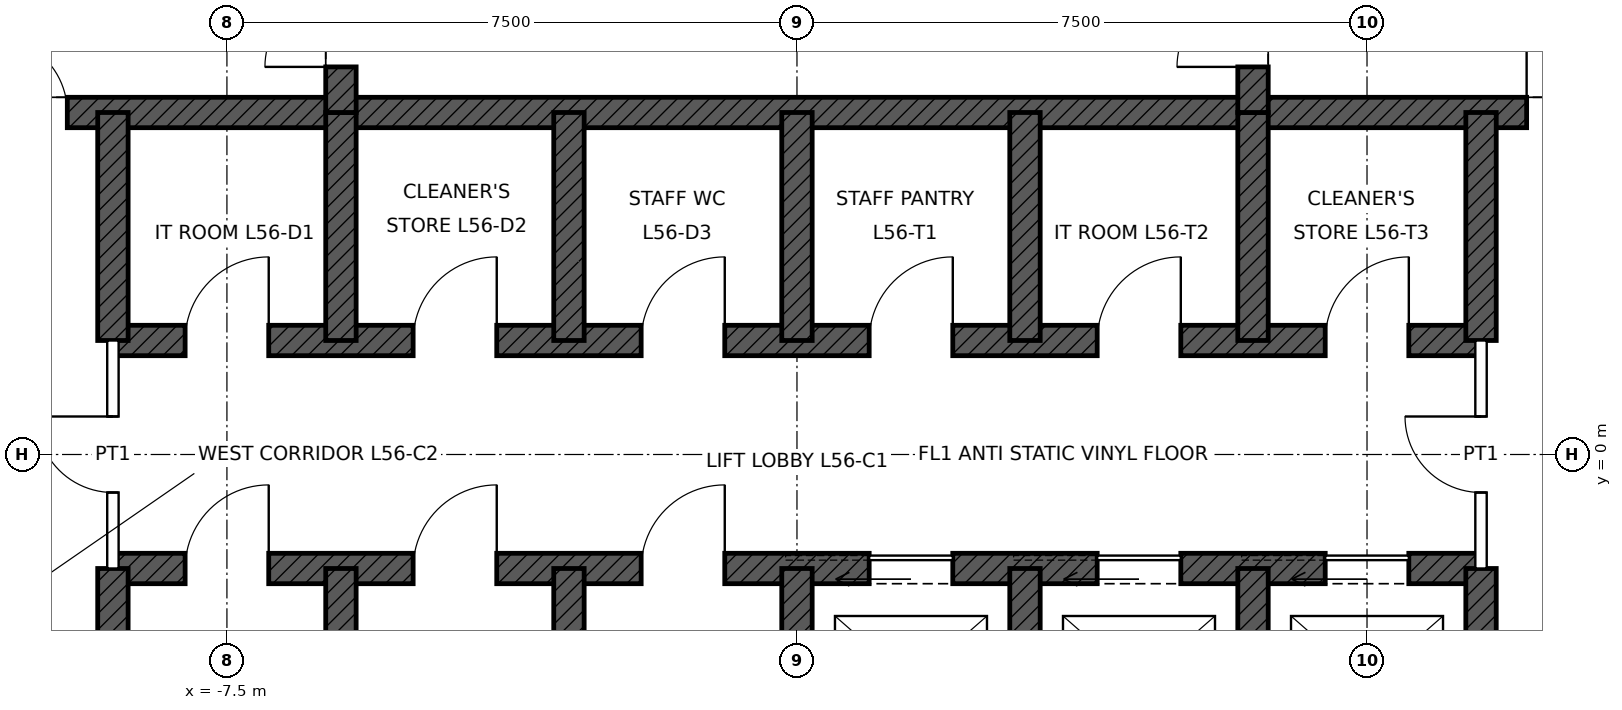
"""IFC4 building model, lengths in metres.
Left out: names, types, materials, properties, quantities, classifications, styles, units other than length and angle.
Written with IfcOpenShell. Run it as: python <this file> out.ifc"""

import sys

from ifc_helpers import new_model, si_unit, direction, frame, frame_2d, origin, place, context, subcontext, project, spatial, rectangle, extrude, element, fill, save


model = new_model("IFC4")
c1 = context("Model", 3, precision=1e-05, world=origin(), true_north=direction((0.0, 1.0)))
c2 = subcontext(c1, "Body", "Model", "MODEL_VIEW")
j1 = project(units=[si_unit("LENGTHUNIT", "METRE"), si_unit("PLANEANGLEUNIT", "RADIAN")], contexts=[c1])
p1 = place(None, origin())
s1 = spatial("IfcSite", under=j1, at=p1, CompositionType="ELEMENT")
p2 = place(p1, origin())
s2 = spatial("IfcBuilding", under=s1, at=p2, CompositionType="ELEMENT")
p3 = place(p2, frame((0.0, 0.0, 259.9)))
s3 = spatial("IfcBuildingStorey", under=s2, at=p3, CompositionType="ELEMENT", Elevation=259.9)
p4 = place(p3, frame((-11.0, 4.5, 0.0), z_axis=(0.0, 0.0, 1.0), x_axis=(1.0, 0.0, 0.0)))
e1 = element("IfcWall", 1, at=p4, inside=s3, PredefinedType="SHEAR", context=c2, shape_type="SweptSolid", body=[
    extrude(rectangle(XDim=22.0, YDim=0.4, at=frame_2d((11.0, 0.0))), origin(), (0.0, 0.0, 1.0), 4.0),
])
p5 = place(p4, frame((0.4, 0.0, 0.0)))
e2 = element("IfcOpeningElement", 2, at=p5, cuts=e1, PredefinedType="OPENING", context=c2, shape_type="SweptSolid", body=[
    extrude(rectangle(XDim=1.0, YDim=2.1, at=frame_2d((0.5, 1.05))), frame((0.0, 0.21, 0.0), z_axis=(0.0, -1.0, 0.0), x_axis=(1.0, 0.0, 0.0)), (0.0, 0.0, 1.0), 0.42),
])
p6 = place(p4, frame((20.6, 0.0, 0.0)))
e3 = element("IfcOpeningElement", 3, at=p6, cuts=e1, PredefinedType="OPENING", context=c2, shape_type="SweptSolid", body=[
    extrude(rectangle(XDim=1.0, YDim=2.1, at=frame_2d((0.5, 1.05))), frame((0.0, 0.21, 0.0), z_axis=(0.0, -1.0, 0.0), x_axis=(1.0, 0.0, 0.0)), (0.0, 0.0, 1.0), 0.42),
])
p7 = place(p3, frame((-9.0, 1.5, 0.0), z_axis=(0.0, 0.0, 1.0), x_axis=(1.0, 0.0, 0.0)))
e4 = element("IfcWall", 4, at=p7, inside=s3, PredefinedType="SHEAR", context=c2, shape_type="SweptSolid", body=[
    extrude(rectangle(XDim=18.0, YDim=0.4, at=frame_2d((9.0, 0.0))), origin(), (0.0, 0.0, 1.0), 4.0),
])
p8 = place(p7, frame((0.95, 0.0, 0.0)))
e5 = element("IfcOpeningElement", 5, at=p8, cuts=e4, PredefinedType="OPENING", context=c2, shape_type="SweptSolid", body=[
    extrude(rectangle(XDim=1.1, YDim=2.1, at=frame_2d((0.55, 1.05))), frame((0.0, 0.21, 0.0), z_axis=(0.0, -1.0, 0.0), x_axis=(1.0, 0.0, 0.0)), (0.0, 0.0, 1.0), 0.42),
])
p9 = place(p7, frame((3.95, 0.0, 0.0)))
e6 = element("IfcOpeningElement", 6, at=p9, cuts=e4, PredefinedType="OPENING", context=c2, shape_type="SweptSolid", body=[
    extrude(rectangle(XDim=1.1, YDim=2.1, at=frame_2d((0.55, 1.05))), frame((0.0, 0.21, 0.0), z_axis=(0.0, -1.0, 0.0), x_axis=(1.0, 0.0, 0.0)), (0.0, 0.0, 1.0), 0.42),
])
p10 = place(p7, frame((6.95, 0.0, 0.0)))
e7 = element("IfcOpeningElement", 7, at=p10, cuts=e4, PredefinedType="OPENING", context=c2, shape_type="SweptSolid", body=[
    extrude(rectangle(XDim=1.1, YDim=2.1, at=frame_2d((0.55, 1.05))), frame((0.0, 0.21, 0.0), z_axis=(0.0, -1.0, 0.0), x_axis=(1.0, 0.0, 0.0)), (0.0, 0.0, 1.0), 0.42),
])
p11 = place(p7, frame((9.95, 0.0, 0.0)))
e8 = element("IfcOpeningElement", 8, at=p11, cuts=e4, PredefinedType="OPENING", context=c2, shape_type="SweptSolid", body=[
    extrude(rectangle(XDim=1.1, YDim=2.1, at=frame_2d((0.55, 1.05))), frame((0.0, 0.21, 0.0), z_axis=(0.0, -1.0, 0.0), x_axis=(1.0, 0.0, 0.0)), (0.0, 0.0, 1.0), 0.42),
])
p12 = place(p7, frame((12.95, 0.0, 0.0)))
e9 = element("IfcOpeningElement", 9, at=p12, cuts=e4, PredefinedType="OPENING", context=c2, shape_type="SweptSolid", body=[
    extrude(rectangle(XDim=1.1, YDim=2.1, at=frame_2d((0.55, 1.05))), frame((0.0, 0.21, 0.0), z_axis=(0.0, -1.0, 0.0), x_axis=(1.0, 0.0, 0.0)), (0.0, 0.0, 1.0), 0.42),
])
p13 = place(p7, frame((15.95, 0.0, 0.0)))
e10 = element("IfcOpeningElement", 10, at=p13, cuts=e4, PredefinedType="OPENING", context=c2, shape_type="SweptSolid", body=[
    extrude(rectangle(XDim=1.1, YDim=2.1, at=frame_2d((0.55, 1.05))), frame((0.0, 0.21, 0.0), z_axis=(0.0, -1.0, 0.0), x_axis=(1.0, 0.0, 0.0)), (0.0, 0.0, 1.0), 0.42),
])
p14 = place(p3, frame((-9.0, -1.5, 0.0), z_axis=(0.0, 0.0, 1.0), x_axis=(1.0, 0.0, 0.0)))
e11 = element("IfcWall", 11, at=p14, inside=s3, PredefinedType="SHEAR", context=c2, shape_type="SweptSolid", body=[
    extrude(rectangle(XDim=18.0, YDim=0.4, at=frame_2d((9.0, 0.0))), origin(), (0.0, 0.0, 1.0), 4.0),
])
p15 = place(p14, frame((9.95, 0.0, 0.0)))
e12 = element("IfcOpeningElement", 12, at=p15, cuts=e11, PredefinedType="OPENING", context=c2, shape_type="SweptSolid", body=[
    extrude(rectangle(XDim=1.1, YDim=2.1, at=frame_2d((0.55, 1.05))), frame((0.0, 0.21, 0.0), z_axis=(0.0, -1.0, 0.0), x_axis=(1.0, 0.0, 0.0)), (0.0, 0.0, 1.0), 0.42),
])
p16 = place(p14, frame((12.95, 0.0, 0.0)))
e13 = element("IfcOpeningElement", 13, at=p16, cuts=e11, PredefinedType="OPENING", context=c2, shape_type="SweptSolid", body=[
    extrude(rectangle(XDim=1.1, YDim=2.1, at=frame_2d((0.55, 1.05))), frame((0.0, 0.21, 0.0), z_axis=(0.0, -1.0, 0.0), x_axis=(1.0, 0.0, 0.0)), (0.0, 0.0, 1.0), 0.42),
])
p17 = place(p14, frame((15.95, 0.0, 0.0)))
e14 = element("IfcOpeningElement", 14, at=p17, cuts=e11, PredefinedType="OPENING", context=c2, shape_type="SweptSolid", body=[
    extrude(rectangle(XDim=1.1, YDim=2.1, at=frame_2d((0.55, 1.05))), frame((0.0, 0.21, 0.0), z_axis=(0.0, -1.0, 0.0), x_axis=(1.0, 0.0, 0.0)), (0.0, 0.0, 1.0), 0.42),
])
p18 = place(p14, frame((0.95, 0.0, 0.0)))
e15 = element("IfcOpeningElement", 15, at=p18, cuts=e11, PredefinedType="OPENING", context=c2, shape_type="SweptSolid", body=[
    extrude(rectangle(XDim=1.1, YDim=2.1, at=frame_2d((0.55, 1.05))), frame((0.0, 0.21, 0.0), z_axis=(0.0, -1.0, 0.0), x_axis=(1.0, 0.0, 0.0)), (0.0, 0.0, 1.0), 0.42),
])
p19 = place(p14, frame((3.95, 0.0, 0.0)))
e16 = element("IfcOpeningElement", 16, at=p19, cuts=e11, PredefinedType="OPENING", context=c2, shape_type="SweptSolid", body=[
    extrude(rectangle(XDim=1.1, YDim=2.1, at=frame_2d((0.55, 1.05))), frame((0.0, 0.21, 0.0), z_axis=(0.0, -1.0, 0.0), x_axis=(1.0, 0.0, 0.0)), (0.0, 0.0, 1.0), 0.42),
])
p20 = place(p14, frame((6.95, 0.0, 0.0)))
e17 = element("IfcOpeningElement", 17, at=p20, cuts=e11, PredefinedType="OPENING", context=c2, shape_type="SweptSolid", body=[
    extrude(rectangle(XDim=1.1, YDim=2.1, at=frame_2d((0.55, 1.05))), frame((0.0, 0.21, 0.0), z_axis=(0.0, -1.0, 0.0), x_axis=(1.0, 0.0, 0.0)), (0.0, 0.0, 1.0), 0.42),
])
for number, where, z_axis, x_axis in (
    (18, (-9.0, 1.5, 0.0), (0.0, 0.0, 1.0), (0.0, 1.0, 0.0)),
    (19, (9.0, 1.5, 0.0), (0.0, 0.0, 1.0), (0.0, 1.0, 0.0)),
    (20, (-9.0, -4.5, 0.0), (0.0, 0.0, 1.0), (0.0, 1.0, 0.0)),
    (21, (9.0, -4.5, 0.0), (0.0, 0.0, 1.0), (0.0, 1.0, 0.0)),
    (22, (-6.0, 1.5, 0.0), (0.0, 0.0, 1.0), (0.0, 1.0, 0.0)),
    (23, (-3.0, 1.5, 0.0), (0.0, 0.0, 1.0), (0.0, 1.0, 0.0)),
    (24, (0.0, 1.5, 0.0), (0.0, 0.0, 1.0), (0.0, 1.0, 0.0)),
    (25, (3.0, 1.5, 0.0), (0.0, 0.0, 1.0), (0.0, 1.0, 0.0)),
    (26, (6.0, 1.5, 0.0), (0.0, 0.0, 1.0), (0.0, 1.0, 0.0)),
    (27, (-6.0, -4.5, 0.0), (0.0, 0.0, 1.0), (0.0, 1.0, 0.0)),
    (28, (-3.0, -4.5, 0.0), (0.0, 0.0, 1.0), (0.0, 1.0, 0.0)),
    (29, (0.0, -4.5, 0.0), (0.0, 0.0, 1.0), (0.0, 1.0, 0.0)),
    (30, (3.0, -4.5, 0.0), (0.0, 0.0, 1.0), (0.0, 1.0, 0.0)),
    (31, (6.0, -4.5, 0.0), (0.0, 0.0, 1.0), (0.0, 1.0, 0.0)),
):
    element("IfcWall", number, at=place(p3, frame(where, z_axis=z_axis, x_axis=x_axis)), inside=s3, PredefinedType="SHEAR", context=c2, shape_type="SweptSolid", body=[
        extrude(rectangle(XDim=3.0, YDim=0.4, at=frame_2d((1.5, 0.0))), origin(), (0.0, 0.0, 1.0), 4.0),
    ])
p21 = place(p3, frame((-6.0, 4.5, 0.0), z_axis=(0.0, 0.0, 1.0), x_axis=(0.0, 1.0, 0.0)))
e32 = element("IfcWall", 32, at=p21, inside=s3, PredefinedType="SHEAR", context=c2, shape_type="SweptSolid", body=[
    extrude(rectangle(XDim=6.5, YDim=0.4, at=frame_2d((3.25, 0.0))), origin(), (0.0, 0.0, 1.0), 4.0),
])
p22 = place(p21, frame((0.6, 0.0, 0.0)))
e33 = element("IfcOpeningElement", 33, at=p22, cuts=e32, PredefinedType="OPENING", context=c2, shape_type="SweptSolid", body=[
    extrude(rectangle(XDim=1.0, YDim=2.1, at=frame_2d((0.5, 1.05))), frame((0.0, 0.21, 0.0), z_axis=(0.0, -1.0, 0.0), x_axis=(1.0, 0.0, 0.0)), (0.0, 0.0, 1.0), 0.42),
])
p23 = place(p3, frame((6.0, 4.5, 0.0), z_axis=(0.0, 0.0, 1.0), x_axis=(0.0, 1.0, 0.0)))
e34 = element("IfcWall", 34, at=p23, inside=s3, PredefinedType="SHEAR", context=c2, shape_type="SweptSolid", body=[
    extrude(rectangle(XDim=6.5, YDim=0.4, at=frame_2d((3.25, 0.0))), origin(), (0.0, 0.0, 1.0), 4.0),
])
p24 = place(p23, frame((0.6, 0.0, 0.0)))
e35 = element("IfcOpeningElement", 35, at=p24, cuts=e34, PredefinedType="OPENING", context=c2, shape_type="SweptSolid", body=[
    extrude(rectangle(XDim=1.0, YDim=2.1, at=frame_2d((0.5, 1.05))), frame((0.0, 0.21, 0.0), z_axis=(0.0, -1.0, 0.0), x_axis=(1.0, 0.0, 0.0)), (0.0, 0.0, 1.0), 0.42),
])
p25 = place(p3, frame((-9.0, -1.5, 0.0), z_axis=(0.0, 0.0, 1.0), x_axis=(0.0, 1.0, 0.0)))
e36 = element("IfcWall", 36, at=p25, inside=s3, PredefinedType="PARTITIONING", context=c2, shape_type="SweptSolid", body=[
    extrude(rectangle(XDim=3.0, YDim=0.15, at=frame_2d((1.5, 0.0))), origin(), (0.0, 0.0, 1.0), 3.75),
])
p26 = place(p25, frame((1.0, 0.0, 0.0)))
e37 = element("IfcOpeningElement", 37, at=p26, cuts=e36, PredefinedType="OPENING", context=c2, shape_type="SweptSolid", body=[
    extrude(rectangle(XDim=1.0, YDim=2.4, at=frame_2d((0.5, 1.2))), frame((0.0, 0.085, 0.0), z_axis=(0.0, -1.0, 0.0), x_axis=(1.0, 0.0, 0.0)), (0.0, 0.0, 1.0), 0.17),
])
p27 = place(p3, frame((9.0, -1.5, 0.0), z_axis=(0.0, 0.0, 1.0), x_axis=(0.0, 1.0, 0.0)))
e38 = element("IfcWall", 38, at=p27, inside=s3, PredefinedType="PARTITIONING", context=c2, shape_type="SweptSolid", body=[
    extrude(rectangle(XDim=3.0, YDim=0.15, at=frame_2d((1.5, 0.0))), origin(), (0.0, 0.0, 1.0), 3.75),
])
p28 = place(p27, frame((1.0, 0.0, 0.0)))
e39 = element("IfcOpeningElement", 39, at=p28, cuts=e38, PredefinedType="OPENING", context=c2, shape_type="SweptSolid", body=[
    extrude(rectangle(XDim=1.0, YDim=2.4, at=frame_2d((0.5, 1.2))), frame((0.0, 0.085, 0.0), z_axis=(0.0, -1.0, 0.0), x_axis=(1.0, 0.0, 0.0)), (0.0, 0.0, 1.0), 0.17),
])
p29 = place(p5, origin())
e40 = element("IfcDoor", 40, at=p29, inside=s3, OperationType="SINGLE_SWING_LEFT", PredefinedType="DOOR", context=c2, shape_type="SweptSolid", body=[
    extrude(rectangle(XDim=1.0, YDim=2.1, at=frame_2d((0.5, 1.05))), frame((0.0, 0.025, 0.0), z_axis=(0.0, -1.0, 0.0), x_axis=(1.0, 0.0, 0.0)), (0.0, 0.0, 1.0), 0.05),
])
fill(e2, e40)
p30 = place(p6, origin())
e41 = element("IfcDoor", 41, at=p30, inside=s3, OperationType="SINGLE_SWING_LEFT", PredefinedType="DOOR", context=c2, shape_type="SweptSolid", body=[
    extrude(rectangle(XDim=1.0, YDim=2.1, at=frame_2d((0.5, 1.05))), frame((0.0, 0.025, 0.0), z_axis=(0.0, -1.0, 0.0), x_axis=(1.0, 0.0, 0.0)), (0.0, 0.0, 1.0), 0.05),
])
fill(e3, e41)
p31 = place(p22, origin())
e42 = element("IfcDoor", 42, at=p31, inside=s3, OperationType="SINGLE_SWING_LEFT", PredefinedType="DOOR", context=c2, shape_type="SweptSolid", body=[
    extrude(rectangle(XDim=1.0, YDim=2.1, at=frame_2d((0.5, 1.05))), frame((0.0, 0.025, 0.0), z_axis=(0.0, -1.0, 0.0), x_axis=(1.0, 0.0, 0.0)), (0.0, 0.0, 1.0), 0.05),
])
fill(e33, e42)
p32 = place(p24, origin())
e43 = element("IfcDoor", 43, at=p32, inside=s3, OperationType="SINGLE_SWING_LEFT", PredefinedType="DOOR", context=c2, shape_type="SweptSolid", body=[
    extrude(rectangle(XDim=1.0, YDim=2.1, at=frame_2d((0.5, 1.05))), frame((0.0, 0.025, 0.0), z_axis=(0.0, -1.0, 0.0), x_axis=(1.0, 0.0, 0.0)), (0.0, 0.0, 1.0), 0.05),
])
fill(e35, e43)
p33 = place(p15, origin())
e44 = element("IfcDoor", 44, at=p33, inside=s3, OperationType="SLIDING_TO_LEFT", PredefinedType="DOOR", context=c2, shape_type="SweptSolid", body=[
    extrude(rectangle(XDim=1.1, YDim=2.1, at=frame_2d((0.55, 1.05))), frame((0.0, 0.025, 0.0), z_axis=(0.0, -1.0, 0.0), x_axis=(1.0, 0.0, 0.0)), (0.0, 0.0, 1.0), 0.05),
])
fill(e12, e44)
p34 = place(p16, origin())
e45 = element("IfcDoor", 45, at=p34, inside=s3, OperationType="SLIDING_TO_LEFT", PredefinedType="DOOR", context=c2, shape_type="SweptSolid", body=[
    extrude(rectangle(XDim=1.1, YDim=2.1, at=frame_2d((0.55, 1.05))), frame((0.0, 0.025, 0.0), z_axis=(0.0, -1.0, 0.0), x_axis=(1.0, 0.0, 0.0)), (0.0, 0.0, 1.0), 0.05),
])
fill(e13, e45)
p35 = place(p17, origin())
e46 = element("IfcDoor", 46, at=p35, inside=s3, OperationType="SLIDING_TO_LEFT", PredefinedType="DOOR", context=c2, shape_type="SweptSolid", body=[
    extrude(rectangle(XDim=1.1, YDim=2.1, at=frame_2d((0.55, 1.05))), frame((0.0, 0.025, 0.0), z_axis=(0.0, -1.0, 0.0), x_axis=(1.0, 0.0, 0.0)), (0.0, 0.0, 1.0), 0.05),
])
fill(e14, e46)
p36 = place(p26, origin())
e47 = element("IfcDoor", 47, at=p36, inside=s3, OperationType="SINGLE_SWING_RIGHT", PredefinedType="DOOR", context=c2, shape_type="SweptSolid", body=[
    extrude(rectangle(XDim=1.0, YDim=2.4, at=frame_2d((0.5, 1.2))), frame((0.0, 0.025, 0.0), z_axis=(0.0, -1.0, 0.0), x_axis=(1.0, 0.0, 0.0)), (0.0, 0.0, 1.0), 0.05),
])
fill(e37, e47)
p37 = place(p28, origin())
e48 = element("IfcDoor", 48, at=p37, inside=s3, OperationType="SINGLE_SWING_RIGHT", PredefinedType="DOOR", context=c2, shape_type="SweptSolid", body=[
    extrude(rectangle(XDim=1.0, YDim=2.4, at=frame_2d((0.5, 1.2))), frame((0.0, 0.025, 0.0), z_axis=(0.0, -1.0, 0.0), x_axis=(1.0, 0.0, 0.0)), (0.0, 0.0, 1.0), 0.05),
])
fill(e39, e48)
p38 = place(p8, origin())
e49 = element("IfcDoor", 49, at=p38, inside=s3, OperationType="SINGLE_SWING_RIGHT", PredefinedType="DOOR", context=c2, shape_type="SweptSolid", body=[
    extrude(rectangle(XDim=1.1, YDim=2.1, at=frame_2d((0.55, 1.05))), frame((0.0, 0.025, 0.0), z_axis=(0.0, -1.0, 0.0), x_axis=(1.0, 0.0, 0.0)), (0.0, 0.0, 1.0), 0.05),
])
fill(e5, e49)
p39 = place(p9, origin())
e50 = element("IfcDoor", 50, at=p39, inside=s3, OperationType="SINGLE_SWING_RIGHT", PredefinedType="DOOR", context=c2, shape_type="SweptSolid", body=[
    extrude(rectangle(XDim=1.1, YDim=2.1, at=frame_2d((0.55, 1.05))), frame((0.0, 0.025, 0.0), z_axis=(0.0, -1.0, 0.0), x_axis=(1.0, 0.0, 0.0)), (0.0, 0.0, 1.0), 0.05),
])
fill(e6, e50)
p40 = place(p10, origin())
e51 = element("IfcDoor", 51, at=p40, inside=s3, OperationType="SINGLE_SWING_RIGHT", PredefinedType="DOOR", context=c2, shape_type="SweptSolid", body=[
    extrude(rectangle(XDim=1.1, YDim=2.1, at=frame_2d((0.55, 1.05))), frame((0.0, 0.025, 0.0), z_axis=(0.0, -1.0, 0.0), x_axis=(1.0, 0.0, 0.0)), (0.0, 0.0, 1.0), 0.05),
])
fill(e7, e51)
p41 = place(p11, origin())
e52 = element("IfcDoor", 52, at=p41, inside=s3, OperationType="SINGLE_SWING_RIGHT", PredefinedType="DOOR", context=c2, shape_type="SweptSolid", body=[
    extrude(rectangle(XDim=1.1, YDim=2.1, at=frame_2d((0.55, 1.05))), frame((0.0, 0.025, 0.0), z_axis=(0.0, -1.0, 0.0), x_axis=(1.0, 0.0, 0.0)), (0.0, 0.0, 1.0), 0.05),
])
fill(e8, e52)
p42 = place(p12, origin())
e53 = element("IfcDoor", 53, at=p42, inside=s3, OperationType="SINGLE_SWING_RIGHT", PredefinedType="DOOR", context=c2, shape_type="SweptSolid", body=[
    extrude(rectangle(XDim=1.1, YDim=2.1, at=frame_2d((0.55, 1.05))), frame((0.0, 0.025, 0.0), z_axis=(0.0, -1.0, 0.0), x_axis=(1.0, 0.0, 0.0)), (0.0, 0.0, 1.0), 0.05),
])
fill(e9, e53)
p43 = place(p13, origin())
e54 = element("IfcDoor", 54, at=p43, inside=s3, OperationType="SINGLE_SWING_RIGHT", PredefinedType="DOOR", context=c2, shape_type="SweptSolid", body=[
    extrude(rectangle(XDim=1.1, YDim=2.1, at=frame_2d((0.55, 1.05))), frame((0.0, 0.025, 0.0), z_axis=(0.0, -1.0, 0.0), x_axis=(1.0, 0.0, 0.0)), (0.0, 0.0, 1.0), 0.05),
])
fill(e10, e54)
p44 = place(p18, origin())
e55 = element("IfcDoor", 55, at=p44, inside=s3, OperationType="SINGLE_SWING_RIGHT", PredefinedType="DOOR", context=c2, shape_type="SweptSolid", body=[
    extrude(rectangle(XDim=1.1, YDim=2.1, at=frame_2d((0.55, 1.05))), frame((0.0, 0.025, 0.0), z_axis=(0.0, -1.0, 0.0), x_axis=(1.0, 0.0, 0.0)), (0.0, 0.0, 1.0), 0.05),
])
fill(e15, e55)
p45 = place(p19, origin())
e56 = element("IfcDoor", 56, at=p45, inside=s3, OperationType="SINGLE_SWING_RIGHT", PredefinedType="DOOR", context=c2, shape_type="SweptSolid", body=[
    extrude(rectangle(XDim=1.1, YDim=2.1, at=frame_2d((0.55, 1.05))), frame((0.0, 0.025, 0.0), z_axis=(0.0, -1.0, 0.0), x_axis=(1.0, 0.0, 0.0)), (0.0, 0.0, 1.0), 0.05),
])
fill(e16, e56)
p46 = place(p20, origin())
e57 = element("IfcDoor", 57, at=p46, inside=s3, OperationType="SINGLE_SWING_RIGHT", PredefinedType="DOOR", context=c2, shape_type="SweptSolid", body=[
    extrude(rectangle(XDim=1.1, YDim=2.1, at=frame_2d((0.55, 1.05))), frame((0.0, 0.025, 0.0), z_axis=(0.0, -1.0, 0.0), x_axis=(1.0, 0.0, 0.0)), (0.0, 0.0, 1.0), 0.05),
])
fill(e17, e57)
save(model, sys.argv[1])
